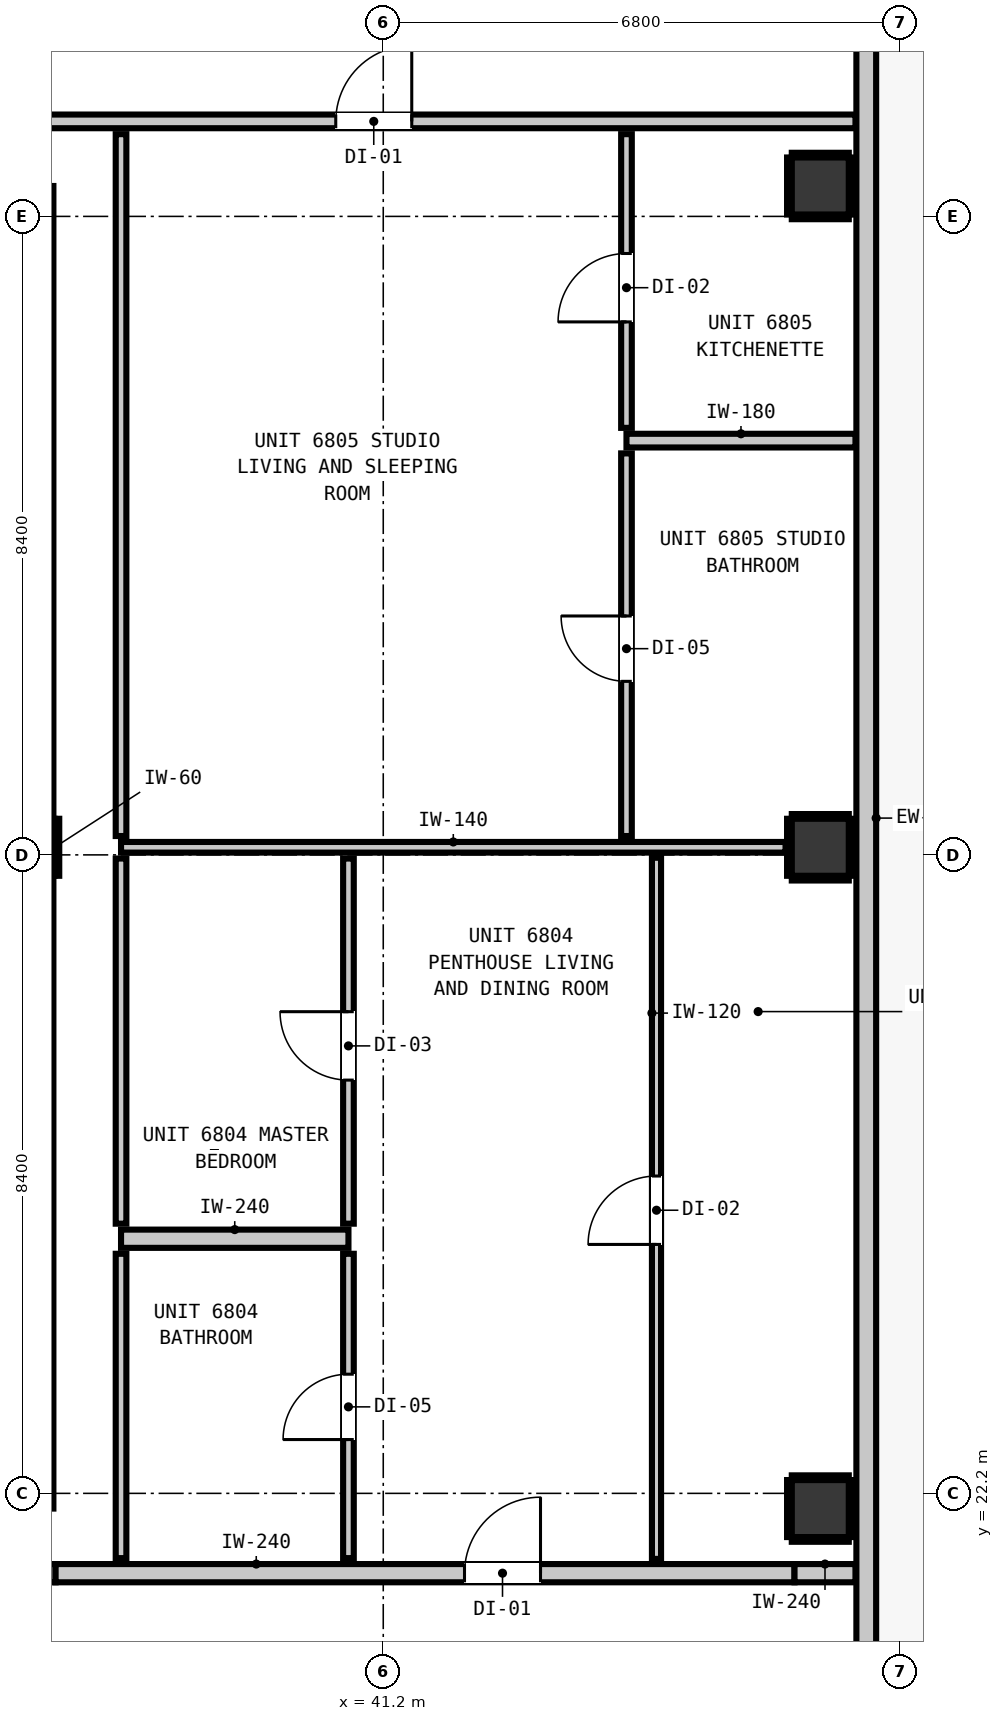
"""IFC4 building model, lengths in metres.
Left out: names, types, materials, properties, quantities, classifications, styles, units other than length and angle.
Written with IfcOpenShell. Run it as: python <this file> out.ifc"""

import sys

from ifc_helpers import new_model, si_unit, direction, frame, frame_2d, origin, origin_2d, place, context, subcontext, project, spatial, rectangle, extrude, element, fill, save


model = new_model("IFC4")
c1 = context("Model", 3, precision=1e-05, world=origin(), true_north=direction((0.0, 1.0)))
c2 = subcontext(c1, "Body", "Model", "MODEL_VIEW")
j1 = project(units=[si_unit("LENGTHUNIT", "METRE"), si_unit("PLANEANGLEUNIT", "RADIAN")], contexts=[c1])
p1 = place(None, origin())
s1 = spatial("IfcSite", under=j1, at=p1, CompositionType="ELEMENT")
p2 = place(p1, origin())
s2 = spatial("IfcBuilding", under=s1, at=p2, CompositionType="ELEMENT")
p3 = place(p2, frame((0.0, 0.0, 234.6)))
s3 = spatial("IfcBuildingStorey", under=s2, at=p3, CompositionType="ELEMENT", Elevation=234.6)
p4 = place(p3, frame((36.5, 30.7, 0.0), z_axis=(0.0, 0.0, 1.0), x_axis=(1.0, 0.0, 0.0)))
e1 = element("IfcColumn", 1, at=p4, inside=s3, PredefinedType="COLUMN", context=c2, shape_type="SweptSolid", body=[
    extrude(rectangle(XDim=0.75, YDim=0.75, at=origin_2d()), origin(), (0.0, 0.0, 1.0), 3.32),
])
p5 = place(p3, frame((36.46, 22.0, 0.0), z_axis=(0.0, 0.0, 1.0), x_axis=(0.0, 1.0, 0.0)))
e2 = element("IfcWall", 2, at=p5, inside=s3, PredefinedType="SHEAR", context=c2, shape_type="SweptSolid", body=[
    extrude(rectangle(XDim=8.32, YDim=0.8, at=frame_2d((4.16, 0.0))), origin(), (0.0, 0.0, 1.0), 3.32),
])
p6 = place(p3, frame((36.46, 31.08, 0.0), z_axis=(0.0, 0.0, 1.0), x_axis=(0.0, 1.0, 0.0)))
e3 = element("IfcWall", 3, at=p6, inside=s3, PredefinedType="SHEAR", context=c2, shape_type="SweptSolid", body=[
    extrude(rectangle(XDim=8.32, YDim=0.8, at=frame_2d((4.16, 0.0))), origin(), (0.0, 0.0, 1.0), 3.32),
])
for number, where, z_axis, x_axis in (
    (4, (46.95, 22.0, 0.0), (0.0, 0.0, 1.0), (1.0, 0.0, 0.0)),
    (5, (46.95, 30.7, 0.0), (0.0, 0.0, 1.0), (1.0, 0.0, 0.0)),
    (6, (46.95, 39.4, 0.0), (0.0, 0.0, 1.0), (1.0, 0.0, 0.0)),
):
    element("IfcColumn", number, at=place(p3, frame(where, z_axis=z_axis, x_axis=x_axis)), inside=s3, PredefinedType="COLUMN", context=c2, shape_type="SweptSolid", body=[
        extrude(rectangle(XDim=0.75, YDim=0.75, at=origin_2d()), origin(), (0.0, 0.0, 1.0), 3.32),
    ])
p7 = place(p3, frame((47.555, 48.855, 0.0), z_axis=(0.0, 0.0, 1.0), x_axis=(0.0, -1.0, 0.0)))
e7 = element("IfcWall", 7, at=p7, inside=s3, PredefinedType="STANDARD", context=c2, shape_type="SweptSolid", body=[
    extrude(rectangle(XDim=30.31, YDim=0.26, at=frame_2d((15.155, 0.0))), origin(), (0.0, 0.0, 1.0), 3.1),
])
p8 = place(p7, frame((0.91, 0.0, 0.0)))
e8 = element("IfcOpeningElement", 8, at=p8, cuts=e7, PredefinedType="OPENING", context=c2, shape_type="SweptSolid", body=[
    extrude(rectangle(XDim=1.0, YDim=2.15, at=frame_2d((0.5, 1.075))), frame((0.0, 0.14, 0.0), z_axis=(0.0, -1.0, 0.0), x_axis=(1.0, 0.0, 0.0)), (0.0, 0.0, 1.0), 0.28),
])
p9 = place(p7, frame((3.782, 0.0, 0.85)))
e9 = element("IfcOpeningElement", 9, at=p9, cuts=e7, PredefinedType="OPENING", context=c2, shape_type="SweptSolid", body=[
    extrude(rectangle(XDim=1.35, YDim=1.85, at=frame_2d((0.675, 0.925))), frame((0.0, 0.14, 0.0), z_axis=(0.0, -1.0, 0.0), x_axis=(1.0, 0.0, 0.0)), (0.0, 0.0, 1.0), 0.28),
])
p10 = place(p3, frame((10.787, 21.15, 0.0), z_axis=(0.0, 0.0, 1.0), x_axis=(1.0, 0.0, 0.0)))
e10 = element("IfcWall", 10, at=p10, inside=s3, PredefinedType="PARTITIONING", context=c2, shape_type="SweptSolid", body=[
    extrude(rectangle(XDim=26.102, YDim=0.24, at=frame_2d((13.051, 0.0))), origin(), (0.0, 0.0, 1.0), 3.1),
])
p11 = place(p10, frame((7.423, 0.0, 0.0)))
e11 = element("IfcOpeningElement", 11, at=p11, cuts=e10, PredefinedType="OPENING", context=c2, shape_type="SweptSolid", body=[
    extrude(rectangle(XDim=1.1, YDim=2.15, at=frame_2d((0.55, 1.075))), frame((0.0, 0.13, 0.0), z_axis=(0.0, -1.0, 0.0), x_axis=(1.0, 0.0, 0.0)), (0.0, 0.0, 1.0), 0.26),
])
p12 = place(p3, frame((36.889, 21.15, 0.0), z_axis=(0.0, 0.0, 1.0), x_axis=(1.0, 0.0, 0.0)))
e12 = element("IfcWall", 12, at=p12, inside=s3, PredefinedType="PARTITIONING", context=c2, shape_type="SweptSolid", body=[
    extrude(rectangle(XDim=9.722, YDim=0.24, at=frame_2d((4.861, 0.0))), origin(), (0.0, 0.0, 1.0), 2.477),
])
p13 = place(p12, frame((5.38, 0.0, 0.0)))
e13 = element("IfcOpeningElement", 13, at=p13, cuts=e12, PredefinedType="OPENING", context=c2, shape_type="SweptSolid", body=[
    extrude(rectangle(XDim=1.0, YDim=2.15, at=frame_2d((0.5, 1.075))), frame((0.0, 0.13, 0.0), z_axis=(0.0, -1.0, 0.0), x_axis=(1.0, 0.0, 0.0)), (0.0, 0.0, 1.0), 0.26),
])
p14 = place(p3, frame((46.611, 21.15, 0.0), z_axis=(0.0, 0.0, 1.0), x_axis=(1.0, 0.0, 0.0)))
e14 = element("IfcWall", 14, at=p14, inside=s3, PredefinedType="PARTITIONING", context=c2, shape_type="SweptSolid", body=[
    extrude(rectangle(XDim=0.802, YDim=0.24, at=frame_2d((0.401, 0.0))), origin(), (0.0, 0.0, 1.0), 3.1),
])
p15 = place(p3, frame((37.75, 25.55, 0.0), z_axis=(0.0, 0.0, 1.0), x_axis=(1.0, 0.0, 0.0)))
e15 = element("IfcWall", 15, at=p15, inside=s3, PredefinedType="PARTITIONING", context=c2, shape_type="SweptSolid", body=[
    extrude(rectangle(XDim=2.992, YDim=0.24, at=frame_2d((1.496, 0.0))), origin(), (0.0, 0.0, 1.0), 3.1),
])
p16 = place(p3, frame((44.4, 36.05, 0.0), z_axis=(0.0, 0.0, 1.0), x_axis=(1.0, 0.0, 0.0)))
e16 = element("IfcWall", 16, at=p16, inside=s3, PredefinedType="PARTITIONING", context=c2, shape_type="SweptSolid", body=[
    extrude(rectangle(XDim=3.013, YDim=0.18, at=frame_2d((1.507, 0.0))), origin(), (0.0, 0.0, 1.0), 3.1),
])
p17 = place(p3, frame((10.787, 40.25, 0.0), z_axis=(0.0, 0.0, 1.0), x_axis=(1.0, 0.0, 0.0)))
e17 = element("IfcWall", 17, at=p17, inside=s3, PredefinedType="PARTITIONING", context=c2, shape_type="SweptSolid", body=[
    extrude(rectangle(XDim=36.626, YDim=0.18, at=frame_2d((18.313, 0.0))), origin(), (0.0, 0.0, 1.0), 3.1),
])
p18 = place(p17, frame((6.648, 0.0, 0.0)))
e18 = element("IfcOpeningElement", 18, at=p18, cuts=e17, PredefinedType="OPENING", context=c2, shape_type="SweptSolid", body=[
    extrude(rectangle(XDim=1.4, YDim=2.15, at=frame_2d((0.7, 1.075))), frame((0.0, 0.1, 0.0), z_axis=(0.0, -1.0, 0.0), x_axis=(1.0, 0.0, 0.0)), (0.0, 0.0, 1.0), 0.2),
])
p19 = place(p17, frame((29.788, 0.0, 0.0)))
e19 = element("IfcOpeningElement", 19, at=p19, cuts=e17, PredefinedType="OPENING", context=c2, shape_type="SweptSolid", body=[
    extrude(rectangle(XDim=1.0, YDim=2.15, at=frame_2d((0.5, 1.075))), frame((0.0, 0.1, 0.0), z_axis=(0.0, -1.0, 0.0), x_axis=(1.0, 0.0, 0.0)), (0.0, 0.0, 1.0), 0.2),
])
p20 = place(p3, frame((37.75, 30.7, 0.0), z_axis=(0.0, 0.0, 1.0), x_axis=(1.0, 0.0, 0.0)))
e20 = element("IfcWall", 20, at=p20, inside=s3, PredefinedType="PARTITIONING", context=c2, shape_type="SweptSolid", body=[
    extrude(rectangle(XDim=8.743, YDim=0.14, at=frame_2d((4.372, 0.0))), origin(), (0.0, 0.0, 1.0), 2.335),
])
p21 = place(p3, frame((37.75, 21.348, 0.0), z_axis=(0.0, 0.0, 1.0), x_axis=(0.0, 1.0, 0.0)))
e21 = element("IfcWall", 21, at=p21, inside=s3, PredefinedType="PARTITIONING", context=c2, shape_type="SweptSolid", body=[
    extrude(rectangle(XDim=4.004, YDim=0.14, at=frame_2d((2.002, 0.0))), origin(), (0.0, 0.0, 1.0), 3.1),
])
p22 = place(p3, frame((37.75, 25.748, 0.0), z_axis=(0.0, 0.0, 1.0), x_axis=(0.0, 1.0, 0.0)))
e22 = element("IfcWall", 22, at=p22, inside=s3, PredefinedType="PARTITIONING", context=c2, shape_type="SweptSolid", body=[
    extrude(rectangle(XDim=4.804, YDim=0.14, at=frame_2d((2.402, 0.0))), origin(), (0.0, 0.0, 1.0), 3.1),
])
p23 = place(p3, frame((37.75, 30.848, 0.0), z_axis=(0.0, 0.0, 1.0), x_axis=(0.0, 1.0, 0.0)))
e23 = element("IfcWall", 23, at=p23, inside=s3, PredefinedType="PARTITIONING", context=c2, shape_type="SweptSolid", body=[
    extrude(rectangle(XDim=9.234, YDim=0.14, at=frame_2d((4.617, 0.0))), origin(), (0.0, 0.0, 1.0), 3.1),
])
p24 = place(p3, frame((40.742, 21.348, 0.0), z_axis=(0.0, 0.0, 1.0), x_axis=(0.0, 1.0, 0.0)))
e24 = element("IfcWall", 24, at=p24, inside=s3, PredefinedType="PARTITIONING", context=c2, shape_type="SweptSolid", body=[
    extrude(rectangle(XDim=4.004, YDim=0.14, at=frame_2d((2.002, 0.0))), origin(), (0.0, 0.0, 1.0), 3.1),
])
p25 = place(p24, frame((1.56, 0.0, 0.0)))
e25 = element("IfcOpeningElement", 25, at=p25, cuts=e24, PredefinedType="OPENING", context=c2, shape_type="SweptSolid", body=[
    extrude(rectangle(XDim=0.86, YDim=2.02, at=frame_2d((0.43, 1.01))), frame((0.0, 0.08, 0.0), z_axis=(0.0, -1.0, 0.0), x_axis=(1.0, 0.0, 0.0)), (0.0, 0.0, 1.0), 0.16),
])
p26 = place(p3, frame((40.742, 25.748, 0.0), z_axis=(0.0, 0.0, 1.0), x_axis=(0.0, 1.0, 0.0)))
e26 = element("IfcWall", 26, at=p26, inside=s3, PredefinedType="PARTITIONING", context=c2, shape_type="SweptSolid", body=[
    extrude(rectangle(XDim=4.804, YDim=0.14, at=frame_2d((2.402, 0.0))), origin(), (0.0, 0.0, 1.0), 3.1),
])
p27 = place(p26, frame((1.889, 0.0, 0.0)))
e27 = element("IfcOpeningElement", 27, at=p27, cuts=e26, PredefinedType="OPENING", context=c2, shape_type="SweptSolid", body=[
    extrude(rectangle(XDim=0.9, YDim=2.1, at=frame_2d((0.45, 1.05))), frame((0.0, 0.08, 0.0), z_axis=(0.0, -1.0, 0.0), x_axis=(1.0, 0.0, 0.0)), (0.0, 0.0, 1.0), 0.16),
])
p28 = place(p3, frame((44.4, 30.848, 0.0), z_axis=(0.0, 0.0, 1.0), x_axis=(0.0, 1.0, 0.0)))
e28 = element("IfcWall", 28, at=p28, inside=s3, PredefinedType="PARTITIONING", context=c2, shape_type="SweptSolid", body=[
    extrude(rectangle(XDim=5.034, YDim=0.14, at=frame_2d((2.517, 0.0))), origin(), (0.0, 0.0, 1.0), 3.1),
])
p29 = place(p28, frame((2.035, 0.0, 0.0)))
e29 = element("IfcOpeningElement", 29, at=p29, cuts=e28, PredefinedType="OPENING", context=c2, shape_type="SweptSolid", body=[
    extrude(rectangle(XDim=0.86, YDim=2.02, at=frame_2d((0.43, 1.01))), frame((0.0, 0.08, 0.0), z_axis=(0.0, -1.0, 0.0), x_axis=(1.0, 0.0, 0.0)), (0.0, 0.0, 1.0), 0.16),
])
p30 = place(p3, frame((44.4, 36.218, 0.0), z_axis=(0.0, 0.0, 1.0), x_axis=(0.0, 1.0, 0.0)))
e30 = element("IfcWall", 30, at=p30, inside=s3, PredefinedType="PARTITIONING", context=c2, shape_type="SweptSolid", body=[
    extrude(rectangle(XDim=3.864, YDim=0.14, at=frame_2d((1.932, 0.0))), origin(), (0.0, 0.0, 1.0), 3.1),
])
p31 = place(p30, frame((1.394, 0.0, 0.0)))
e31 = element("IfcOpeningElement", 31, at=p31, cuts=e30, PredefinedType="OPENING", context=c2, shape_type="SweptSolid", body=[
    extrude(rectangle(XDim=0.9, YDim=2.1, at=frame_2d((0.45, 1.05))), frame((0.0, 0.08, 0.0), z_axis=(0.0, -1.0, 0.0), x_axis=(1.0, 0.0, 0.0)), (0.0, 0.0, 1.0), 0.16),
])
p32 = place(p3, frame((44.795, 21.338, 0.0), z_axis=(0.0, 0.0, 1.0), x_axis=(0.0, 1.0, 0.0)))
e32 = element("IfcWall", 32, at=p32, inside=s3, PredefinedType="PARTITIONING", context=c2, shape_type="SweptSolid", body=[
    extrude(rectangle(XDim=9.224, YDim=0.12, at=frame_2d((4.612, 0.0))), origin(), (0.0, 0.0, 1.0), 3.1),
])
p33 = place(p32, frame((4.137, 0.0, 0.0)))
e33 = element("IfcOpeningElement", 33, at=p33, cuts=e32, PredefinedType="OPENING", context=c2, shape_type="SweptSolid", body=[
    extrude(rectangle(XDim=0.9, YDim=2.1, at=frame_2d((0.45, 1.05))), frame((0.0, 0.07, 0.0), z_axis=(0.0, -1.0, 0.0), x_axis=(1.0, 0.0, 0.0)), (0.0, 0.0, 1.0), 0.14),
])
for number, where, z_axis, x_axis in (
    (34, (36.907, 30.325, 0.0), (0.0, 0.0, 1.0), (0.0, 1.0, 0.0)),
    (35, (46.575, 21.593, 0.0), (0.0, 0.0, 1.0), (1.0, 0.0, 0.0)),
    (36, (46.575, 22.407, 0.0), (0.0, 0.0, 1.0), (1.0, 0.0, 0.0)),
    (37, (46.543, 21.625, 0.0), (0.0, 0.0, 1.0), (0.0, 1.0, 0.0)),
    (38, (47.357, 21.625, 0.0), (0.0, 0.0, 1.0), (0.0, 1.0, 0.0)),
    (39, (46.575, 30.293, 0.0), (0.0, 0.0, 1.0), (1.0, 0.0, 0.0)),
    (40, (46.575, 31.107, 0.0), (0.0, 0.0, 1.0), (1.0, 0.0, 0.0)),
    (41, (46.543, 30.325, 0.0), (0.0, 0.0, 1.0), (0.0, 1.0, 0.0)),
    (42, (47.357, 30.325, 0.0), (0.0, 0.0, 1.0), (0.0, 1.0, 0.0)),
    (43, (46.575, 38.993, 0.0), (0.0, 0.0, 1.0), (1.0, 0.0, 0.0)),
    (44, (46.575, 39.807, 0.0), (0.0, 0.0, 1.0), (1.0, 0.0, 0.0)),
    (45, (46.543, 39.025, 0.0), (0.0, 0.0, 1.0), (0.0, 1.0, 0.0)),
    (46, (47.357, 39.025, 0.0), (0.0, 0.0, 1.0), (0.0, 1.0, 0.0)),
):
    element("IfcWall", number, at=place(p3, frame(where, z_axis=z_axis, x_axis=x_axis)), inside=s3, PredefinedType="PARTITIONING", context=c2, shape_type="SweptSolid", body=[
        extrude(rectangle(XDim=0.75, YDim=0.06, at=frame_2d((0.375, 0.0))), origin(), (0.0, 0.0, 1.0), 1.45),
    ])
p34 = place(p13, origin())
e47 = element("IfcDoor", 47, at=p34, inside=s3, OperationType="SINGLE_SWING_RIGHT", PredefinedType="DOOR", context=c2, shape_type="SweptSolid", body=[
    extrude(rectangle(XDim=1.0, YDim=2.15, at=frame_2d((0.5, 1.075))), frame((0.0, 0.025, 0.0), z_axis=(0.0, -1.0, 0.0), x_axis=(1.0, 0.0, 0.0)), (0.0, 0.0, 1.0), 0.05),
])
fill(e13, e47)
p35 = place(p25, origin())
e48 = element("IfcDoor", 48, at=p35, inside=s3, OperationType="SINGLE_SWING_LEFT", PredefinedType="DOOR", context=c2, shape_type="SweptSolid", body=[
    extrude(rectangle(XDim=0.86, YDim=2.02, at=frame_2d((0.43, 1.01))), frame((0.0, 0.025, 0.0), z_axis=(0.0, -1.0, 0.0), x_axis=(1.0, 0.0, 0.0)), (0.0, 0.0, 1.0), 0.05),
])
fill(e25, e48)
p36 = place(p27, origin())
e49 = element("IfcDoor", 49, at=p36, inside=s3, OperationType="SINGLE_SWING_RIGHT", PredefinedType="DOOR", context=c2, shape_type="SweptSolid", body=[
    extrude(rectangle(XDim=0.9, YDim=2.1, at=frame_2d((0.45, 1.05))), frame((0.0, 0.025, 0.0), z_axis=(0.0, -1.0, 0.0), x_axis=(1.0, 0.0, 0.0)), (0.0, 0.0, 1.0), 0.05),
])
fill(e27, e49)
p37 = place(p33, origin())
e50 = element("IfcDoor", 50, at=p37, inside=s3, OperationType="SINGLE_SWING_LEFT", PredefinedType="DOOR", context=c2, shape_type="SweptSolid", body=[
    extrude(rectangle(XDim=0.9, YDim=2.1, at=frame_2d((0.45, 1.05))), frame((0.0, 0.025, 0.0), z_axis=(0.0, -1.0, 0.0), x_axis=(1.0, 0.0, 0.0)), (0.0, 0.0, 1.0), 0.05),
])
fill(e33, e50)
p38 = place(p19, origin())
e51 = element("IfcDoor", 51, at=p38, inside=s3, OperationType="SINGLE_SWING_RIGHT", PredefinedType="DOOR", context=c2, shape_type="SweptSolid", body=[
    extrude(rectangle(XDim=1.0, YDim=2.15, at=frame_2d((0.5, 1.075))), frame((0.0, 0.025, 0.0), z_axis=(0.0, -1.0, 0.0), x_axis=(1.0, 0.0, 0.0)), (0.0, 0.0, 1.0), 0.05),
])
fill(e19, e51)
p39 = place(p31, origin())
e52 = element("IfcDoor", 52, at=p39, inside=s3, OperationType="SINGLE_SWING_LEFT", PredefinedType="DOOR", context=c2, shape_type="SweptSolid", body=[
    extrude(rectangle(XDim=0.9, YDim=2.1, at=frame_2d((0.45, 1.05))), frame((0.0, 0.025, 0.0), z_axis=(0.0, -1.0, 0.0), x_axis=(1.0, 0.0, 0.0)), (0.0, 0.0, 1.0), 0.05),
])
fill(e31, e52)
p40 = place(p29, origin())
e53 = element("IfcDoor", 53, at=p40, inside=s3, OperationType="SINGLE_SWING_RIGHT", PredefinedType="DOOR", context=c2, shape_type="SweptSolid", body=[
    extrude(rectangle(XDim=0.86, YDim=2.02, at=frame_2d((0.43, 1.01))), frame((0.0, 0.025, 0.0), z_axis=(0.0, -1.0, 0.0), x_axis=(1.0, 0.0, 0.0)), (0.0, 0.0, 1.0), 0.05),
])
fill(e29, e53)
save(model, sys.argv[1])
